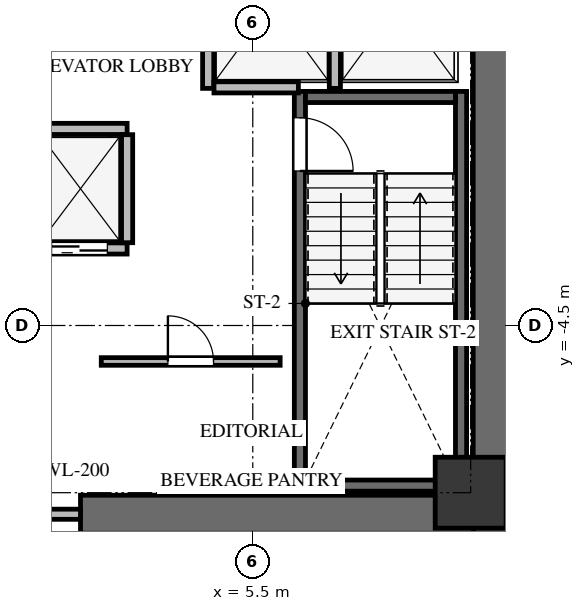
"""IFC4 building model, lengths in metres.
Left out: names, types, materials, properties, quantities, classifications, styles, units other than length and angle.
Written with IfcOpenShell. Run it as: python <this file> out.ifc"""

import sys

from ifc_helpers import new_model, si_unit, direction, frame, frame_2d, origin, origin_2d, place, context, subcontext, project, spatial, rectangle, extrude, source, transform, mapped, element, fill, save


model = new_model("IFC4")
c1 = context("Model", 3, precision=1e-05, world=origin(), true_north=direction((0.0, 1.0)))
c2 = subcontext(c1, "Body", "Model", "MODEL_VIEW")
j1 = project(units=[si_unit("LENGTHUNIT", "METRE"), si_unit("PLANEANGLEUNIT", "RADIAN")], contexts=[c1])
p1 = place(None, origin())
s1 = spatial("IfcSite", under=j1, at=p1, CompositionType="ELEMENT")
p2 = place(p1, origin())
s2 = spatial("IfcBuilding", under=s1, at=p2, CompositionType="ELEMENT")
p3 = place(p2, frame((0.0, 0.0, 127.2)))
s3 = spatial("IfcBuildingStorey", under=s2, at=p3, CompositionType="ELEMENT", Elevation=127.2)
p4 = place(p3, frame((10.225, -8.6, 0.0), z_axis=(0.0, 0.0, 1.0), x_axis=(0.0, 1.0, 0.0)))
e1 = element("IfcWall", 1, at=p4, inside=s3, PredefinedType="SHEAR", context=c2, shape_type="SweptSolid", body=[
    extrude(rectangle(XDim=17.2, YDim=0.75, at=frame_2d((8.6, 0.0))), origin(), (0.0, 0.0, 1.0), 3.3),
])
p5 = place(p3, frame((2.1, -8.225, 0.0), z_axis=(0.0, 0.0, 1.0), x_axis=(1.0, 0.0, 0.0)))
e2 = element("IfcWall", 2, at=p5, inside=s3, PredefinedType="SHEAR", context=c2, shape_type="SweptSolid", body=[
    extrude(rectangle(XDim=7.75, YDim=0.75, at=frame_2d((3.875, 0.0))), origin(), (0.0, 0.0, 1.0), 3.3),
])
p6 = place(p3, frame((9.61, -7.77, -0.24), z_axis=(0.0, 0.0, 1.0), x_axis=(0.0, 1.0, 0.0)))
e3 = element("IfcWall", 3, at=p6, inside=s3, PredefinedType="SHEAR", context=c2, shape_type="SweptSolid", body=[
    extrude(rectangle(XDim=7.89, YDim=0.22, at=frame_2d((3.945, 0.0))), origin(), (0.0, 0.0, 1.0), 3.3),
])
p7 = place(p3, frame((6.43, 0.12, -0.24), z_axis=(0.0, 0.0, 1.0), x_axis=(0.0, -1.0, 0.0)))
e4 = element("IfcWall", 4, at=p7, inside=s3, PredefinedType="SHEAR", context=c2, shape_type="SweptSolid", body=[
    extrude(rectangle(XDim=7.89, YDim=0.22, at=frame_2d((3.945, 0.0))), origin(), (0.0, 0.0, 1.0), 3.3),
])
p8 = place(p7, frame((0.52, 0.0, 0.0)))
e5 = element("IfcOpeningElement", 5, at=p8, cuts=e4, PredefinedType="OPENING", context=c2, shape_type="SweptSolid", body=[
    extrude(rectangle(XDim=1.05, YDim=2.15, at=frame_2d((0.525, 1.075))), frame((0.0, 0.12, 0.0), z_axis=(0.0, -1.0, 0.0), x_axis=(1.0, 0.0, 0.0)), (0.0, 0.0, 1.0), 0.24),
])
for number, where, z_axis, x_axis in (
    (6, (6.54, -7.66, -0.24), (0.0, 0.0, 1.0), (1.0, 0.0, 0.0)),
    (7, (9.5, 0.01, -0.24), (0.0, 0.0, 1.0), (-1.0, 0.0, 0.0)),
):
    element("IfcWall", number, at=place(p3, frame(where, z_axis=z_axis, x_axis=x_axis)), inside=s3, PredefinedType="SHEAR", context=c2, shape_type="SweptSolid", body=[
        extrude(rectangle(XDim=2.96, YDim=0.22, at=frame_2d((1.48, 0.0))), origin(), (0.0, 0.0, 1.0), 3.3),
    ])
m1 = source(origin(), c2, "Body", "SweptSolid", [
    extrude(rectangle(XDim=1.4, YDim=1.4, at=origin_2d()), origin(), (0.0, 0.0, 1.0), 3.3),
])
p9 = place(p3, frame((9.8, -7.8, -0.24), z_axis=(0.0, 0.0, 1.0), x_axis=(1.0, 0.0, 0.0)))
e8 = element("IfcColumn", 8, at=p9, inside=s3, PredefinedType="COLUMN", context=c2, shape_type="MappedRepresentation", body=[
    mapped(m1, transform((0.0, 0.0, 0.0), x_axis=(1.0, 0.0, 0.0), y_axis=(0.0, 1.0, 0.0), z_axis=(0.0, 0.0, 1.0), scale=1.0)),
])
p10 = place(p3, frame((-2.1, -8.225, 0.0), z_axis=(0.0, 0.0, 1.0), x_axis=(1.0, 0.0, 0.0)))
e9 = element("IfcWall", 9, at=p10, inside=s3, PredefinedType="SOLIDWALL", context=c2, shape_type="SweptSolid", body=[
    extrude(rectangle(XDim=4.2, YDim=0.2, at=frame_2d((2.1, 0.0))), origin(), (0.0, 0.0, 1.0), 3.045),
])
p11 = place(p10, frame((1.2, 0.0, 0.0)))
e10 = element("IfcOpeningElement", 10, at=p11, cuts=e9, PredefinedType="OPENING", context=c2, shape_type="SweptSolid", body=[
    extrude(rectangle(XDim=1.8, YDim=2.15, at=frame_2d((0.9, 1.075))), frame((0.0, 0.11, 0.0), z_axis=(0.0, -1.0, 0.0), x_axis=(1.0, 0.0, 0.0)), (0.0, 0.0, 1.0), 0.22),
])
for number, where, z_axis, x_axis in (
    (11, (4.62, 0.18, 0.0), (0.0, 0.0, 1.0), (0.0, 1.0, 0.0)),
    (12, (7.12, 0.18, 0.0), (0.0, 0.0, 1.0), (0.0, 1.0, 0.0)),
):
    element("IfcWall", number, at=place(p3, frame(where, z_axis=z_axis, x_axis=x_axis)), inside=s3, PredefinedType="SOLIDWALL", context=c2, shape_type="SweptSolid", body=[
        extrude(rectangle(XDim=3.186, YDim=0.22, at=frame_2d((1.593, 0.0))), origin(), (0.0, 0.0, 1.0), 3.045),
    ])
p12 = place(p3, frame((4.734, 0.2, 0.0), z_axis=(0.0, 0.0, 1.0), x_axis=(1.0, 0.0, 0.0)))
e13 = element("IfcWall", 13, at=p12, inside=s3, PredefinedType="SOLIDWALL", context=c2, shape_type="SweptSolid", body=[
    extrude(rectangle(XDim=1.666, YDim=0.22, at=frame_2d((0.833, 0.0))), origin(), (0.0, 0.0, 1.0), 3.045),
])
p13 = place(p3, frame((-4.22, -2.98, 0.0), z_axis=(0.0, 0.0, 1.0), x_axis=(1.0, 0.0, 0.0)))
e14 = element("IfcWall", 14, at=p13, inside=s3, PredefinedType="SOLIDWALL", context=c2, shape_type="SweptSolid", body=[
    extrude(rectangle(XDim=7.24, YDim=0.22, at=frame_2d((3.62, 0.0))), origin(), (0.0, 0.0, 1.0), 3.045),
])
p14 = place(p13, frame((0.35, 0.0, 0.0)))
e15 = element("IfcOpeningElement", 15, at=p14, cuts=e14, PredefinedType="OPENING", context=c2, shape_type="SweptSolid", body=[
    extrude(rectangle(XDim=1.1, YDim=2.15, at=frame_2d((0.55, 1.075))), frame((0.0, 0.12, 0.0), z_axis=(0.0, -1.0, 0.0), x_axis=(1.0, 0.0, 0.0)), (0.0, 0.0, 1.0), 0.24),
])
p15 = place(p13, frame((2.15, 0.0, 0.0)))
e16 = element("IfcOpeningElement", 16, at=p15, cuts=e14, PredefinedType="OPENING", context=c2, shape_type="SweptSolid", body=[
    extrude(rectangle(XDim=1.1, YDim=2.15, at=frame_2d((0.55, 1.075))), frame((0.0, 0.12, 0.0), z_axis=(0.0, -1.0, 0.0), x_axis=(1.0, 0.0, 0.0)), (0.0, 0.0, 1.0), 0.24),
])
p16 = place(p13, frame((3.95, 0.0, 0.0)))
e17 = element("IfcOpeningElement", 17, at=p16, cuts=e14, PredefinedType="OPENING", context=c2, shape_type="SweptSolid", body=[
    extrude(rectangle(XDim=1.1, YDim=2.15, at=frame_2d((0.55, 1.075))), frame((0.0, 0.12, 0.0), z_axis=(0.0, -1.0, 0.0), x_axis=(1.0, 0.0, 0.0)), (0.0, 0.0, 1.0), 0.24),
])
p17 = place(p13, frame((5.75, 0.0, 0.0)))
e18 = element("IfcOpeningElement", 18, at=p17, cuts=e14, PredefinedType="OPENING", context=c2, shape_type="SweptSolid", body=[
    extrude(rectangle(XDim=1.1, YDim=2.15, at=frame_2d((0.55, 1.075))), frame((0.0, 0.12, 0.0), z_axis=(0.0, -1.0, 0.0), x_axis=(1.0, 0.0, 0.0)), (0.0, 0.0, 1.0), 0.24),
])
p18 = place(p3, frame((-4.22, -0.62, 0.0), z_axis=(0.0, 0.0, 1.0), x_axis=(1.0, 0.0, 0.0)))
e19 = element("IfcWall", 19, at=p18, inside=s3, PredefinedType="SOLIDWALL", context=c2, shape_type="SweptSolid", body=[
    extrude(rectangle(XDim=7.24, YDim=0.22, at=frame_2d((3.62, 0.0))), origin(), (0.0, 0.0, 1.0), 3.045),
])
p19 = place(p3, frame((3.02, -2.866, 0.0), z_axis=(0.0, 0.0, 1.0), x_axis=(0.0, 1.0, 0.0)))
e20 = element("IfcWall", 20, at=p19, inside=s3, PredefinedType="SOLIDWALL", context=c2, shape_type="SweptSolid", body=[
    extrude(rectangle(XDim=2.132, YDim=0.22, at=frame_2d((1.066, 0.0))), origin(), (0.0, 0.0, 1.0), 3.045),
])
p20 = place(p3, frame((2.51, -5.21, 0.0), z_axis=(0.0, 0.0, 1.0), x_axis=(1.0, 0.0, 0.0)))
e21 = element("IfcWall", 21, at=p20, inside=s3, PredefinedType="PARTITIONING", context=c2, shape_type="SweptSolid", body=[
    extrude(rectangle(XDim=3.53, YDim=0.15, at=frame_2d((1.765, 0.0))), origin(), (0.0, 0.0, 1.0), 3.045),
])
p21 = place(p20, frame((1.315, 0.0, 0.0)))
e22 = element("IfcOpeningElement", 22, at=p21, cuts=e21, PredefinedType="OPENING", context=c2, shape_type="SweptSolid", body=[
    extrude(rectangle(XDim=0.9, YDim=2.05, at=frame_2d((0.45, 1.025))), frame((0.0, 0.085, 0.0), z_axis=(0.0, -1.0, 0.0), x_axis=(1.0, 0.0, 0.0)), (0.0, 0.0, 1.0), 0.17),
])
m2 = source(origin(), c2, "Body", "SweptSolid", [
    extrude(rectangle(XDim=1.05, YDim=2.15, at=frame_2d((0.525, 1.075))), frame((0.0, 0.025, 0.0), z_axis=(0.0, -1.0, 0.0), x_axis=(1.0, 0.0, 0.0)), (0.0, 0.0, 1.0), 0.05),
])
p22 = place(p8, origin())
e23 = element("IfcDoor", 23, at=p22, inside=s3, OperationType="SINGLE_SWING_RIGHT", PredefinedType="DOOR", context=c2, shape_type="MappedRepresentation", body=[
    mapped(m2, transform((0.0, 0.0, 0.0), x_axis=(1.0, 0.0, 0.0), y_axis=(0.0, 1.0, 0.0), z_axis=(0.0, 0.0, 1.0), scale=1.0)),
])
fill(e5, e23)
m3 = source(origin(), c2, "Body", "SweptSolid", [
    extrude(rectangle(XDim=1.1, YDim=2.15, at=frame_2d((0.55, 1.075))), frame((0.0, 0.025, 0.0), z_axis=(0.0, -1.0, 0.0), x_axis=(1.0, 0.0, 0.0)), (0.0, 0.0, 1.0), 0.05),
])
p23 = place(p17, origin())
e24 = element("IfcDoor", 24, at=p23, inside=s3, OperationType="DOUBLE_DOOR_SLIDING", PredefinedType="DOOR", context=c2, shape_type="MappedRepresentation", body=[
    mapped(m3, transform((0.0, 0.0, 0.0), x_axis=(1.0, 0.0, 0.0), y_axis=(0.0, 1.0, 0.0), z_axis=(0.0, 0.0, 1.0), scale=1.0)),
])
fill(e18, e24)
m4 = source(origin(), c2, "Body", "SweptSolid", [
    extrude(rectangle(XDim=0.9, YDim=2.05, at=frame_2d((0.45, 1.025))), frame((0.0, 0.025, 0.0), z_axis=(0.0, -1.0, 0.0), x_axis=(1.0, 0.0, 0.0)), (0.0, 0.0, 1.0), 0.05),
])
p24 = place(p21, origin())
e25 = element("IfcDoor", 25, at=p24, inside=s3, OperationType="SINGLE_SWING_LEFT", PredefinedType="DOOR", context=c2, shape_type="MappedRepresentation", body=[
    mapped(m4, transform((0.0, 0.0, 0.0), x_axis=(1.0, 0.0, 0.0), y_axis=(0.0, 1.0, 0.0), z_axis=(0.0, 0.0, 1.0), scale=1.0)),
])
fill(e22, e25)
save(model, sys.argv[1])
